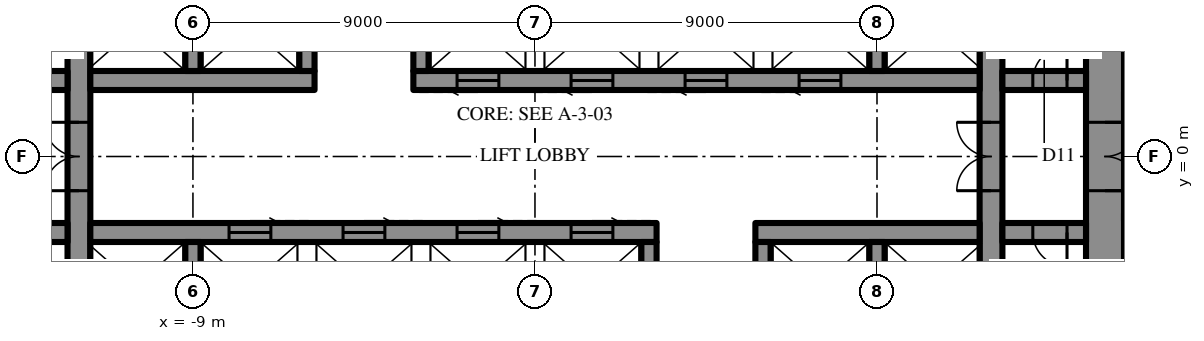
"""IFC4 building model, lengths in metres.
Left out: names, types, materials, properties, quantities, classifications, styles, units other than length and angle.
Written with IfcOpenShell. Run it as: python <this file> out.ifc"""

import sys

from ifc_helpers import new_model, si_unit, direction, frame, frame_2d, origin, place, context, subcontext, project, spatial, rectangle, extrude, element, fill, save


model = new_model("IFC4")
c1 = context("Model", 3, precision=1e-05, world=origin(), true_north=direction((0.0, 1.0)))
c2 = subcontext(c1, "Body", "Model", "MODEL_VIEW")
j1 = project(units=[si_unit("LENGTHUNIT", "METRE"), si_unit("PLANEANGLEUNIT", "RADIAN")], contexts=[c1])
p1 = place(None, origin())
s1 = spatial("IfcSite", under=j1, at=p1, CompositionType="ELEMENT")
p2 = place(p1, origin())
s2 = spatial("IfcBuilding", under=s1, at=p2, CompositionType="ELEMENT")
p3 = place(p2, frame((0.0, 0.0, 228.1)))
s3 = spatial("IfcBuildingStorey", under=s2, at=p3, CompositionType="ELEMENT", Elevation=228.1)
p4 = place(p3, frame((15.0, -10.7, 0.0), z_axis=(0.0, 0.0, 1.0), x_axis=(0.0, 1.0, 0.0)))
e1 = element("IfcWall", 1, at=p4, inside=s3, PredefinedType="SHEAR", context=c2, shape_type="SweptSolid", body=[
    extrude(rectangle(XDim=21.4, YDim=1.0, at=frame_2d((10.7, 0.0))), origin(), (0.0, 0.0, 1.0), 4.2),
])
p5 = place(p4, frame((9.8, 0.0, 0.0)))
e2 = element("IfcOpeningElement", 2, at=p5, cuts=e1, PredefinedType="OPENING", context=c2, shape_type="SweptSolid", body=[
    extrude(rectangle(XDim=1.8, YDim=2.4, at=frame_2d((0.9, 1.2))), frame((0.0, 0.51, 0.0), z_axis=(0.0, -1.0, 0.0), x_axis=(1.0, 0.0, 0.0)), (0.0, 0.0, 1.0), 1.02),
])
p6 = place(p3, frame((12.0, -10.7, 0.0), z_axis=(0.0, 0.0, 1.0), x_axis=(0.0, 1.0, 0.0)))
e3 = element("IfcWall", 3, at=p6, inside=s3, PredefinedType="SHEAR", context=c2, shape_type="SweptSolid", body=[
    extrude(rectangle(XDim=21.4, YDim=0.6, at=frame_2d((10.7, 0.0))), origin(), (0.0, 0.0, 1.0), 4.2),
])
p7 = place(p6, frame((9.8, 0.0, 0.0)))
e4 = element("IfcOpeningElement", 4, at=p7, cuts=e3, PredefinedType="OPENING", context=c2, shape_type="SweptSolid", body=[
    extrude(rectangle(XDim=1.8, YDim=2.4, at=frame_2d((0.9, 1.2))), frame((0.0, 0.31, 0.0), z_axis=(0.0, -1.0, 0.0), x_axis=(1.0, 0.0, 0.0)), (0.0, 0.0, 1.0), 0.62),
])
p8 = place(p3, frame((-12.0, -10.7, 0.0), z_axis=(0.0, 0.0, 1.0), x_axis=(0.0, 1.0, 0.0)))
e5 = element("IfcWall", 5, at=p8, inside=s3, PredefinedType="SHEAR", context=c2, shape_type="SweptSolid", body=[
    extrude(rectangle(XDim=21.4, YDim=0.6, at=frame_2d((10.7, 0.0))), origin(), (0.0, 0.0, 1.0), 4.2),
])
p9 = place(p8, frame((9.8, 0.0, 0.0)))
e6 = element("IfcOpeningElement", 6, at=p9, cuts=e5, PredefinedType="OPENING", context=c2, shape_type="SweptSolid", body=[
    extrude(rectangle(XDim=1.8, YDim=2.4, at=frame_2d((0.9, 1.2))), frame((0.0, 0.31, 0.0), z_axis=(0.0, -1.0, 0.0), x_axis=(1.0, 0.0, 0.0)), (0.0, 0.0, 1.0), 0.62),
])
p10 = place(p3, frame((-14.5, 2.0, 0.0), z_axis=(0.0, 0.0, 1.0), x_axis=(1.0, 0.0, 0.0)))
e7 = element("IfcWall", 7, at=p10, inside=s3, PredefinedType="SHEAR", context=c2, shape_type="SweptSolid", body=[
    extrude(rectangle(XDim=2.2, YDim=0.5, at=frame_2d((1.1, 0.0))), origin(), (0.0, 0.0, 1.0), 4.2),
])
p11 = place(p10, frame((0.5, 0.0, 0.0)))
e8 = element("IfcOpeningElement", 8, at=p11, cuts=e7, PredefinedType="OPENING", context=c2, shape_type="SweptSolid", body=[
    extrude(rectangle(XDim=0.9, YDim=2.2, at=frame_2d((0.45, 1.1))), frame((0.0, 0.26, 0.0), z_axis=(0.0, -1.0, 0.0), x_axis=(1.0, 0.0, 0.0)), (0.0, 0.0, 1.0), 0.52),
])
p12 = place(p3, frame((-11.7, 2.0, 0.0), z_axis=(0.0, 0.0, 1.0), x_axis=(1.0, 0.0, 0.0)))
e9 = element("IfcWall", 9, at=p12, inside=s3, PredefinedType="SHEAR", context=c2, shape_type="SweptSolid", body=[
    extrude(rectangle(XDim=5.9, YDim=0.5, at=frame_2d((2.95, 0.0))), origin(), (0.0, 0.0, 1.0), 4.2),
])
p13 = place(p3, frame((-3.2, 2.0, 0.0), z_axis=(0.0, 0.0, 1.0), x_axis=(1.0, 0.0, 0.0)))
e10 = element("IfcWall", 10, at=p13, inside=s3, PredefinedType="SHEAR", context=c2, shape_type="SweptSolid", body=[
    extrude(rectangle(XDim=14.9, YDim=0.5, at=frame_2d((7.45, 0.0))), origin(), (0.0, 0.0, 1.0), 4.2),
])
p14 = place(p13, frame((1.15, 0.0, 0.0)))
e11 = element("IfcOpeningElement", 11, at=p14, cuts=e10, PredefinedType="OPENING", context=c2, shape_type="SweptSolid", body=[
    extrude(rectangle(XDim=1.1, YDim=2.2, at=frame_2d((0.55, 1.1))), frame((0.0, 0.26, 0.0), z_axis=(0.0, -1.0, 0.0), x_axis=(1.0, 0.0, 0.0)), (0.0, 0.0, 1.0), 0.52),
])
p15 = place(p13, frame((4.15, 0.0, 0.0)))
e12 = element("IfcOpeningElement", 12, at=p15, cuts=e10, PredefinedType="OPENING", context=c2, shape_type="SweptSolid", body=[
    extrude(rectangle(XDim=1.1, YDim=2.2, at=frame_2d((0.55, 1.1))), frame((0.0, 0.26, 0.0), z_axis=(0.0, -1.0, 0.0), x_axis=(1.0, 0.0, 0.0)), (0.0, 0.0, 1.0), 0.52),
])
p16 = place(p13, frame((7.15, 0.0, 0.0)))
e13 = element("IfcOpeningElement", 13, at=p16, cuts=e10, PredefinedType="OPENING", context=c2, shape_type="SweptSolid", body=[
    extrude(rectangle(XDim=1.1, YDim=2.2, at=frame_2d((0.55, 1.1))), frame((0.0, 0.26, 0.0), z_axis=(0.0, -1.0, 0.0), x_axis=(1.0, 0.0, 0.0)), (0.0, 0.0, 1.0), 0.52),
])
p17 = place(p13, frame((10.15, 0.0, 0.0)))
e14 = element("IfcOpeningElement", 14, at=p17, cuts=e10, PredefinedType="OPENING", context=c2, shape_type="SweptSolid", body=[
    extrude(rectangle(XDim=1.1, YDim=2.2, at=frame_2d((0.55, 1.1))), frame((0.0, 0.26, 0.0), z_axis=(0.0, -1.0, 0.0), x_axis=(1.0, 0.0, 0.0)), (0.0, 0.0, 1.0), 0.52),
])
p18 = place(p3, frame((12.3, 2.0, 0.0), z_axis=(0.0, 0.0, 1.0), x_axis=(1.0, 0.0, 0.0)))
e15 = element("IfcWall", 15, at=p18, inside=s3, PredefinedType="SHEAR", context=c2, shape_type="SweptSolid", body=[
    extrude(rectangle(XDim=2.2, YDim=0.5, at=frame_2d((1.1, 0.0))), origin(), (0.0, 0.0, 1.0), 4.2),
])
p19 = place(p18, frame((0.8, 0.0, 0.0)))
e16 = element("IfcOpeningElement", 16, at=p19, cuts=e15, PredefinedType="OPENING", context=c2, shape_type="SweptSolid", body=[
    extrude(rectangle(XDim=0.9, YDim=2.2, at=frame_2d((0.45, 1.1))), frame((0.0, 0.26, 0.0), z_axis=(0.0, -1.0, 0.0), x_axis=(1.0, 0.0, 0.0)), (0.0, 0.0, 1.0), 0.52),
])
for number, where, z_axis, x_axis in (
    (17, (-9.0, 2.25, 0.0), (0.0, 0.0, 1.0), (0.0, 1.0, 0.0)),
    (18, (-6.0, 2.25, 0.0), (0.0, 0.0, 1.0), (0.0, 1.0, 0.0)),
    (19, (-3.0, 2.25, 0.0), (0.0, 0.0, 1.0), (0.0, 1.0, 0.0)),
    (20, (9.0, 2.25, 0.0), (0.0, 0.0, 1.0), (0.0, 1.0, 0.0)),
):
    element("IfcWall", number, at=place(p3, frame(where, z_axis=z_axis, x_axis=x_axis)), inside=s3, PredefinedType="SHEAR", context=c2, shape_type="SweptSolid", body=[
        extrude(rectangle(XDim=2.3, YDim=0.4, at=frame_2d((1.15, 0.0))), origin(), (0.0, 0.0, 1.0), 4.2),
    ])
p20 = place(p3, frame((14.5, -2.0, 0.0), z_axis=(0.0, 0.0, 1.0), x_axis=(-1.0, 0.0, 0.0)))
e21 = element("IfcWall", 21, at=p20, inside=s3, PredefinedType="SHEAR", context=c2, shape_type="SweptSolid", body=[
    extrude(rectangle(XDim=2.2, YDim=0.5, at=frame_2d((1.1, 0.0))), origin(), (0.0, 0.0, 1.0), 4.2),
])
p21 = place(p20, frame((0.5, 0.0, 0.0)))
e22 = element("IfcOpeningElement", 22, at=p21, cuts=e21, PredefinedType="OPENING", context=c2, shape_type="SweptSolid", body=[
    extrude(rectangle(XDim=0.9, YDim=2.2, at=frame_2d((0.45, 1.1))), frame((0.0, 0.26, 0.0), z_axis=(0.0, -1.0, 0.0), x_axis=(1.0, 0.0, 0.0)), (0.0, 0.0, 1.0), 0.52),
])
p22 = place(p3, frame((11.7, -2.0, 0.0), z_axis=(0.0, 0.0, 1.0), x_axis=(-1.0, 0.0, 0.0)))
e23 = element("IfcWall", 23, at=p22, inside=s3, PredefinedType="SHEAR", context=c2, shape_type="SweptSolid", body=[
    extrude(rectangle(XDim=5.9, YDim=0.5, at=frame_2d((2.95, 0.0))), origin(), (0.0, 0.0, 1.0), 4.2),
])
p23 = place(p3, frame((3.2, -2.0, 0.0), z_axis=(0.0, 0.0, 1.0), x_axis=(-1.0, 0.0, 0.0)))
e24 = element("IfcWall", 24, at=p23, inside=s3, PredefinedType="SHEAR", context=c2, shape_type="SweptSolid", body=[
    extrude(rectangle(XDim=14.9, YDim=0.5, at=frame_2d((7.45, 0.0))), origin(), (0.0, 0.0, 1.0), 4.2),
])
p24 = place(p23, frame((1.15, 0.0, 0.0)))
e25 = element("IfcOpeningElement", 25, at=p24, cuts=e24, PredefinedType="OPENING", context=c2, shape_type="SweptSolid", body=[
    extrude(rectangle(XDim=1.1, YDim=2.2, at=frame_2d((0.55, 1.1))), frame((0.0, 0.26, 0.0), z_axis=(0.0, -1.0, 0.0), x_axis=(1.0, 0.0, 0.0)), (0.0, 0.0, 1.0), 0.52),
])
p25 = place(p23, frame((4.15, 0.0, 0.0)))
e26 = element("IfcOpeningElement", 26, at=p25, cuts=e24, PredefinedType="OPENING", context=c2, shape_type="SweptSolid", body=[
    extrude(rectangle(XDim=1.1, YDim=2.2, at=frame_2d((0.55, 1.1))), frame((0.0, 0.26, 0.0), z_axis=(0.0, -1.0, 0.0), x_axis=(1.0, 0.0, 0.0)), (0.0, 0.0, 1.0), 0.52),
])
p26 = place(p23, frame((7.15, 0.0, 0.0)))
e27 = element("IfcOpeningElement", 27, at=p26, cuts=e24, PredefinedType="OPENING", context=c2, shape_type="SweptSolid", body=[
    extrude(rectangle(XDim=1.1, YDim=2.2, at=frame_2d((0.55, 1.1))), frame((0.0, 0.26, 0.0), z_axis=(0.0, -1.0, 0.0), x_axis=(1.0, 0.0, 0.0)), (0.0, 0.0, 1.0), 0.52),
])
p27 = place(p23, frame((10.15, 0.0, 0.0)))
e28 = element("IfcOpeningElement", 28, at=p27, cuts=e24, PredefinedType="OPENING", context=c2, shape_type="SweptSolid", body=[
    extrude(rectangle(XDim=1.1, YDim=2.2, at=frame_2d((0.55, 1.1))), frame((0.0, 0.26, 0.0), z_axis=(0.0, -1.0, 0.0), x_axis=(1.0, 0.0, 0.0)), (0.0, 0.0, 1.0), 0.52),
])
p28 = place(p3, frame((-12.3, -2.0, 0.0), z_axis=(0.0, 0.0, 1.0), x_axis=(-1.0, 0.0, 0.0)))
e29 = element("IfcWall", 29, at=p28, inside=s3, PredefinedType="SHEAR", context=c2, shape_type="SweptSolid", body=[
    extrude(rectangle(XDim=2.2, YDim=0.5, at=frame_2d((1.1, 0.0))), origin(), (0.0, 0.0, 1.0), 4.2),
])
p29 = place(p28, frame((0.8, 0.0, 0.0)))
e30 = element("IfcOpeningElement", 30, at=p29, cuts=e29, PredefinedType="OPENING", context=c2, shape_type="SweptSolid", body=[
    extrude(rectangle(XDim=0.9, YDim=2.2, at=frame_2d((0.45, 1.1))), frame((0.0, 0.26, 0.0), z_axis=(0.0, -1.0, 0.0), x_axis=(1.0, 0.0, 0.0)), (0.0, 0.0, 1.0), 0.52),
])
for number, where, z_axis, x_axis in (
    (31, (9.0, -2.25, 0.0), (0.0, 0.0, 1.0), (0.0, -1.0, 0.0)),
    (32, (6.0, -2.25, 0.0), (0.0, 0.0, 1.0), (0.0, -1.0, 0.0)),
    (33, (3.0, -2.25, 0.0), (0.0, 0.0, 1.0), (0.0, -1.0, 0.0)),
    (34, (-9.0, -2.25, 0.0), (0.0, 0.0, 1.0), (0.0, -1.0, 0.0)),
):
    element("IfcWall", number, at=place(p3, frame(where, z_axis=z_axis, x_axis=x_axis)), inside=s3, PredefinedType="SHEAR", context=c2, shape_type="SweptSolid", body=[
        extrude(rectangle(XDim=2.3, YDim=0.4, at=frame_2d((1.15, 0.0))), origin(), (0.0, 0.0, 1.0), 4.2),
    ])
for number, where, z_axis, x_axis in (
    (35, (15.5, 1.6, 0.0), (0.0, 0.0, 1.0), (1.0, 0.0, 0.0)),
    (36, (15.5, -1.6, 0.0), (0.0, 0.0, 1.0), (1.0, 0.0, 0.0)),
):
    element("IfcWall", number, at=place(p3, frame(where, z_axis=z_axis, x_axis=x_axis)), inside=s3, PredefinedType="PARTITIONING", context=c2, shape_type="SweptSolid", body=[
        extrude(rectangle(XDim=2.3, YDim=0.2, at=frame_2d((1.15, 0.0))), origin(), (0.0, 0.0, 1.0), 4.0),
    ])
p30 = place(p5, frame((1.8, 0.0, 0.0), z_axis=(0.0, 0.0, 1.0), x_axis=(-1.0, 0.0, 0.0)))
e37 = element("IfcDoor", 37, at=p30, inside=s3, OperationType="DOUBLE_DOOR_SINGLE_SWING", PredefinedType="DOOR", context=c2, shape_type="SweptSolid", body=[
    extrude(rectangle(XDim=1.8, YDim=2.4, at=frame_2d((0.9, 1.2))), frame((0.0, 0.025, 0.0), z_axis=(0.0, -1.0, 0.0), x_axis=(1.0, 0.0, 0.0)), (0.0, 0.0, 1.0), 0.05),
])
fill(e2, e37)
p31 = place(p19, origin())
e38 = element("IfcDoor", 38, at=p31, inside=s3, OperationType="SINGLE_SWING_LEFT", PredefinedType="DOOR", context=c2, shape_type="SweptSolid", body=[
    extrude(rectangle(XDim=0.9, YDim=2.2, at=frame_2d((0.45, 1.1))), frame((0.0, 0.025, 0.0), z_axis=(0.0, -1.0, 0.0), x_axis=(1.0, 0.0, 0.0)), (0.0, 0.0, 1.0), 0.05),
])
fill(e16, e38)
p32 = place(p21, origin())
e39 = element("IfcDoor", 39, at=p32, inside=s3, OperationType="SINGLE_SWING_RIGHT", PredefinedType="DOOR", context=c2, shape_type="SweptSolid", body=[
    extrude(rectangle(XDim=0.9, YDim=2.2, at=frame_2d((0.45, 1.1))), frame((0.0, 0.025, 0.0), z_axis=(0.0, -1.0, 0.0), x_axis=(1.0, 0.0, 0.0)), (0.0, 0.0, 1.0), 0.05),
])
fill(e22, e39)
p33 = place(p7, origin())
e40 = element("IfcDoor", 40, at=p33, inside=s3, OperationType="DOUBLE_DOOR_SINGLE_SWING", PredefinedType="DOOR", context=c2, shape_type="SweptSolid", body=[
    extrude(rectangle(XDim=1.8, YDim=2.4, at=frame_2d((0.9, 1.2))), frame((0.0, 0.025, 0.0), z_axis=(0.0, -1.0, 0.0), x_axis=(1.0, 0.0, 0.0)), (0.0, 0.0, 1.0), 0.05),
])
fill(e4, e40)
p34 = place(p9, origin())
e41 = element("IfcDoor", 41, at=p34, inside=s3, OperationType="DOUBLE_DOOR_SINGLE_SWING", PredefinedType="DOOR", context=c2, shape_type="SweptSolid", body=[
    extrude(rectangle(XDim=1.8, YDim=2.4, at=frame_2d((0.9, 1.2))), frame((0.0, 0.025, 0.0), z_axis=(0.0, -1.0, 0.0), x_axis=(1.0, 0.0, 0.0)), (0.0, 0.0, 1.0), 0.05),
])
fill(e6, e41)
p35 = place(p14, frame((1.1, 0.0, 0.0), z_axis=(0.0, 0.0, 1.0), x_axis=(-1.0, 0.0, 0.0)))
e42 = element("IfcDoor", 42, at=p35, inside=s3, OperationType="SLIDING_TO_LEFT", PredefinedType="DOOR", context=c2, shape_type="SweptSolid", body=[
    extrude(rectangle(XDim=1.1, YDim=2.2, at=frame_2d((0.55, 1.1))), frame((0.0, 0.025, 0.0), z_axis=(0.0, -1.0, 0.0), x_axis=(1.0, 0.0, 0.0)), (0.0, 0.0, 1.0), 0.05),
])
fill(e11, e42)
p36 = place(p15, frame((1.1, 0.0, 0.0), z_axis=(0.0, 0.0, 1.0), x_axis=(-1.0, 0.0, 0.0)))
e43 = element("IfcDoor", 43, at=p36, inside=s3, OperationType="SLIDING_TO_LEFT", PredefinedType="DOOR", context=c2, shape_type="SweptSolid", body=[
    extrude(rectangle(XDim=1.1, YDim=2.2, at=frame_2d((0.55, 1.1))), frame((0.0, 0.025, 0.0), z_axis=(0.0, -1.0, 0.0), x_axis=(1.0, 0.0, 0.0)), (0.0, 0.0, 1.0), 0.05),
])
fill(e12, e43)
p37 = place(p16, frame((1.1, 0.0, 0.0), z_axis=(0.0, 0.0, 1.0), x_axis=(-1.0, 0.0, 0.0)))
e44 = element("IfcDoor", 44, at=p37, inside=s3, OperationType="SLIDING_TO_LEFT", PredefinedType="DOOR", context=c2, shape_type="SweptSolid", body=[
    extrude(rectangle(XDim=1.1, YDim=2.2, at=frame_2d((0.55, 1.1))), frame((0.0, 0.025, 0.0), z_axis=(0.0, -1.0, 0.0), x_axis=(1.0, 0.0, 0.0)), (0.0, 0.0, 1.0), 0.05),
])
fill(e13, e44)
p38 = place(p17, frame((1.1, 0.0, 0.0), z_axis=(0.0, 0.0, 1.0), x_axis=(-1.0, 0.0, 0.0)))
e45 = element("IfcDoor", 45, at=p38, inside=s3, OperationType="SLIDING_TO_LEFT", PredefinedType="DOOR", context=c2, shape_type="SweptSolid", body=[
    extrude(rectangle(XDim=1.1, YDim=2.2, at=frame_2d((0.55, 1.1))), frame((0.0, 0.025, 0.0), z_axis=(0.0, -1.0, 0.0), x_axis=(1.0, 0.0, 0.0)), (0.0, 0.0, 1.0), 0.05),
])
fill(e14, e45)
p39 = place(p24, frame((1.1, 0.0, 0.0), z_axis=(0.0, 0.0, 1.0), x_axis=(-1.0, 0.0, 0.0)))
e46 = element("IfcDoor", 46, at=p39, inside=s3, OperationType="SLIDING_TO_LEFT", PredefinedType="DOOR", context=c2, shape_type="SweptSolid", body=[
    extrude(rectangle(XDim=1.1, YDim=2.2, at=frame_2d((0.55, 1.1))), frame((0.0, 0.025, 0.0), z_axis=(0.0, -1.0, 0.0), x_axis=(1.0, 0.0, 0.0)), (0.0, 0.0, 1.0), 0.05),
])
fill(e25, e46)
p40 = place(p25, frame((1.1, 0.0, 0.0), z_axis=(0.0, 0.0, 1.0), x_axis=(-1.0, 0.0, 0.0)))
e47 = element("IfcDoor", 47, at=p40, inside=s3, OperationType="SLIDING_TO_LEFT", PredefinedType="DOOR", context=c2, shape_type="SweptSolid", body=[
    extrude(rectangle(XDim=1.1, YDim=2.2, at=frame_2d((0.55, 1.1))), frame((0.0, 0.025, 0.0), z_axis=(0.0, -1.0, 0.0), x_axis=(1.0, 0.0, 0.0)), (0.0, 0.0, 1.0), 0.05),
])
fill(e26, e47)
p41 = place(p26, frame((1.1, 0.0, 0.0), z_axis=(0.0, 0.0, 1.0), x_axis=(-1.0, 0.0, 0.0)))
e48 = element("IfcDoor", 48, at=p41, inside=s3, OperationType="SLIDING_TO_LEFT", PredefinedType="DOOR", context=c2, shape_type="SweptSolid", body=[
    extrude(rectangle(XDim=1.1, YDim=2.2, at=frame_2d((0.55, 1.1))), frame((0.0, 0.025, 0.0), z_axis=(0.0, -1.0, 0.0), x_axis=(1.0, 0.0, 0.0)), (0.0, 0.0, 1.0), 0.05),
])
fill(e27, e48)
p42 = place(p27, frame((1.1, 0.0, 0.0), z_axis=(0.0, 0.0, 1.0), x_axis=(-1.0, 0.0, 0.0)))
e49 = element("IfcDoor", 49, at=p42, inside=s3, OperationType="SLIDING_TO_LEFT", PredefinedType="DOOR", context=c2, shape_type="SweptSolid", body=[
    extrude(rectangle(XDim=1.1, YDim=2.2, at=frame_2d((0.55, 1.1))), frame((0.0, 0.025, 0.0), z_axis=(0.0, -1.0, 0.0), x_axis=(1.0, 0.0, 0.0)), (0.0, 0.0, 1.0), 0.05),
])
fill(e28, e49)
save(model, sys.argv[1])
